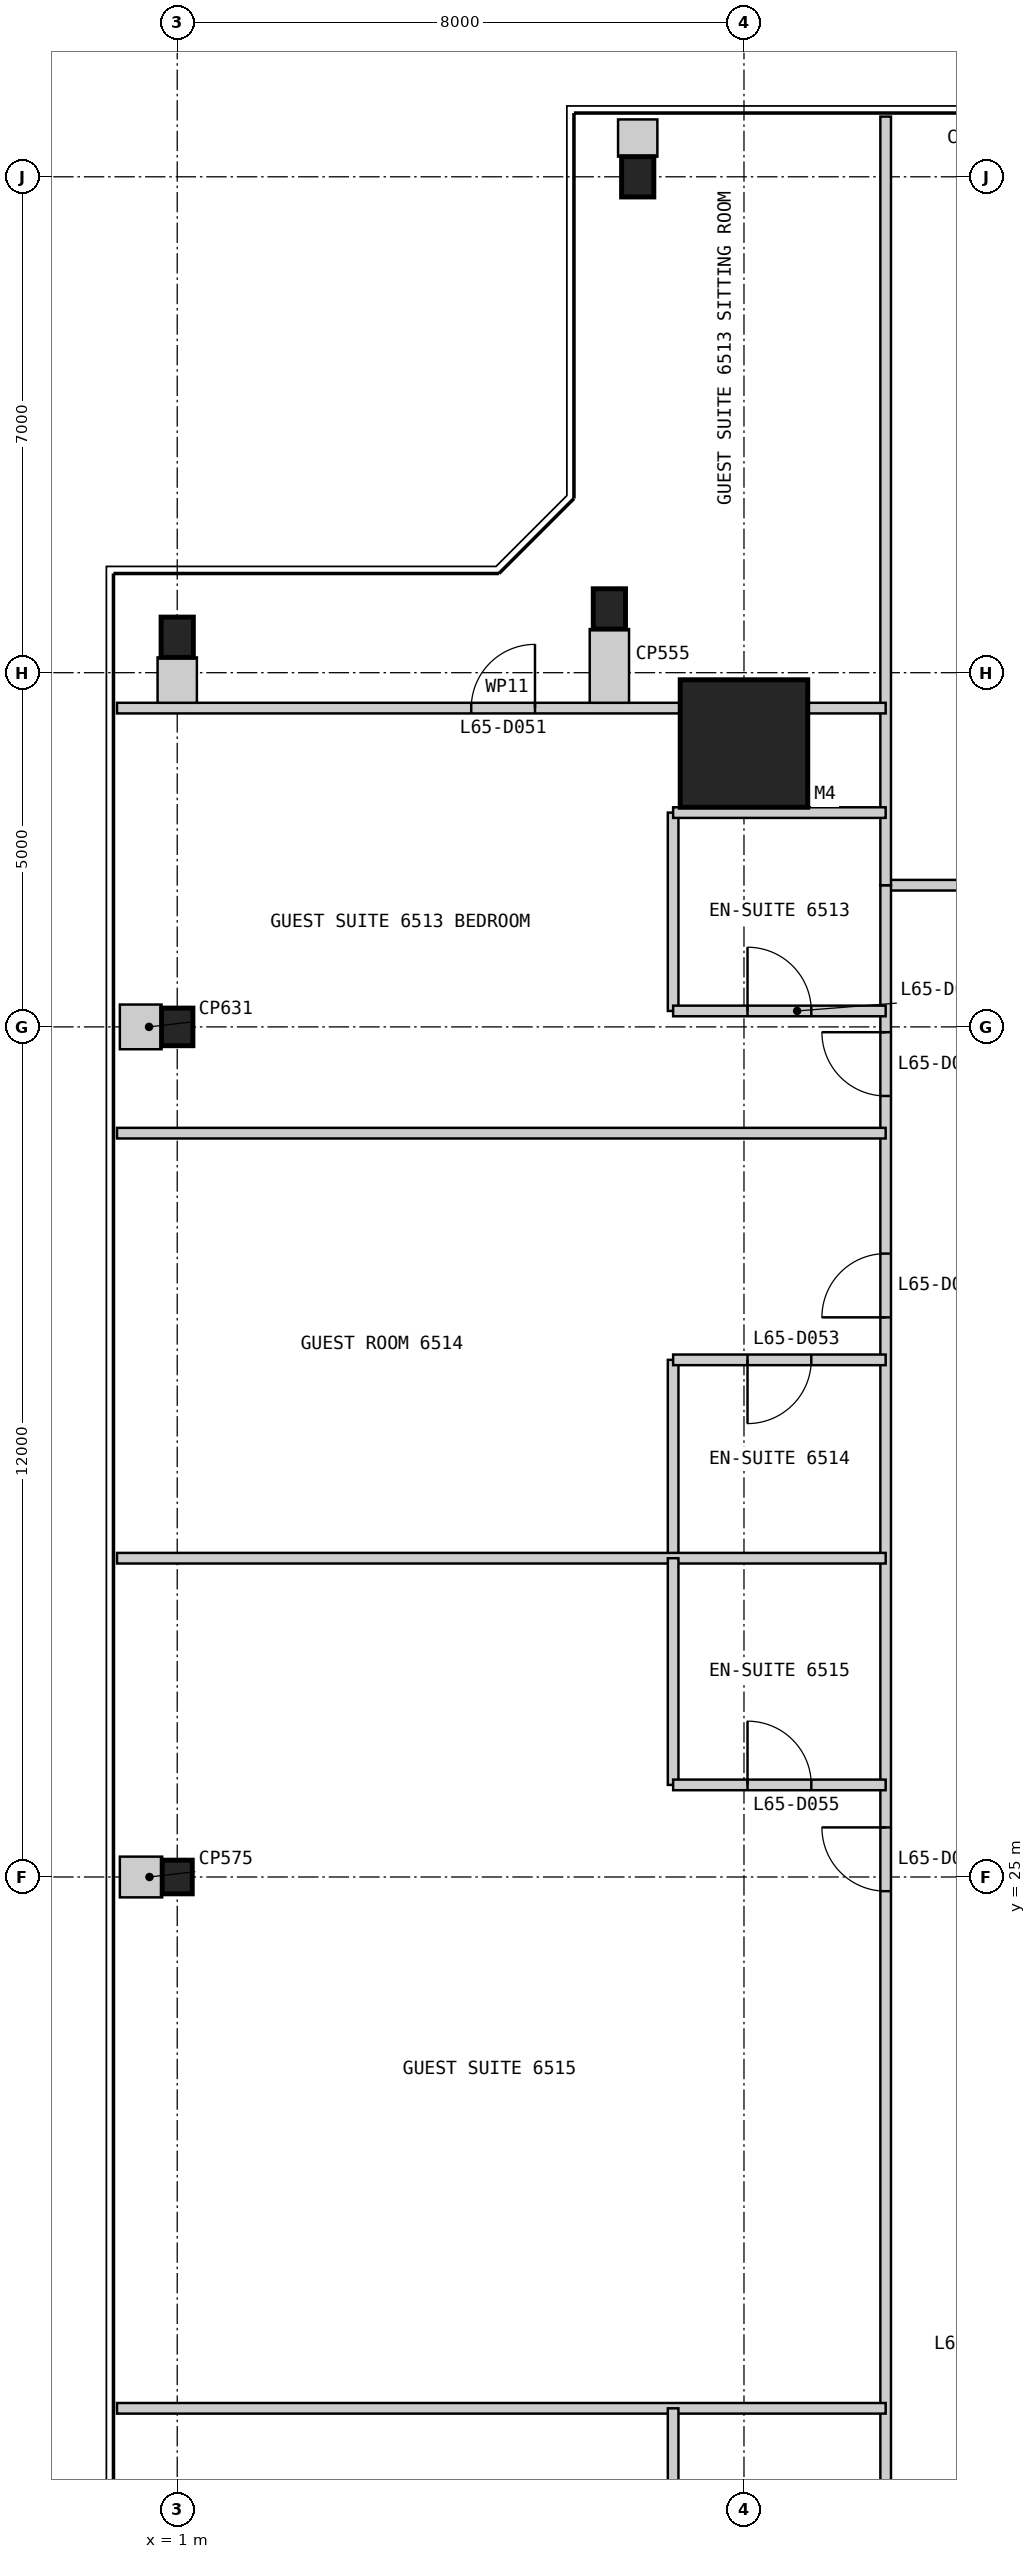
"""IFC4 building model, lengths in metres.
Left out: names, types, materials, properties, quantities, classifications, styles, units other than length and angle.
Written with IfcOpenShell. Run it as: python <this file> out.ifc"""

import sys

from ifc_helpers import new_model, si_unit, direction, frame, frame_2d, origin, origin_2d, place, context, subcontext, project, spatial, rectangle, i_section, extrude, element, fill, save


model = new_model("IFC4")
c1 = context("Model", 3, precision=1e-05, world=origin(), true_north=direction((0.0, 1.0)))
c2 = subcontext(c1, "Body", "Model", "MODEL_VIEW")
j1 = project(units=[si_unit("LENGTHUNIT", "METRE"), si_unit("PLANEANGLEUNIT", "RADIAN")], contexts=[c1])
p1 = place(None, origin())
s1 = spatial("IfcSite", under=j1, at=p1, CompositionType="ELEMENT")
p2 = place(p1, origin())
s2 = spatial("IfcBuilding", under=s1, at=p2, CompositionType="ELEMENT")
p3 = place(p2, frame((0.0, 0.0, 273.0)))
s3 = spatial("IfcBuildingStorey", under=s2, at=p3, CompositionType="ELEMENT", Elevation=273.0)
p4 = place(p3, frame((9.0, 41.0, 0.0), z_axis=(0.0, 0.0, 1.0), x_axis=(1.0, 0.0, 0.0)))
e1 = element("IfcColumn", 1, at=p4, inside=s3, PredefinedType="COLUMN", context=c2, shape_type="SweptSolid", body=[
    extrude(rectangle(XDim=1.8, YDim=1.8, at=origin_2d()), origin(), (0.0, 0.0, 1.0), 3.4),
])
for number, where, z_axis, x_axis in (
    (2, (7.5, 49.0, 0.0), (0.0, 0.0, 1.0), (1.0, 0.0, 0.0)),
    (3, (7.1, 42.9, 0.0), (0.0, 0.0, 1.0), (1.0, 0.0, 0.0)),
    (4, (1.0, 42.5, 0.0), (0.0, 0.0, 1.0), (1.0, 0.0, 0.0)),
):
    element("IfcColumn", number, at=place(p3, frame(where, z_axis=z_axis, x_axis=x_axis)), inside=s3, PredefinedType="COLUMN", context=c2, shape_type="SweptSolid", body=[
        extrude(i_section(OverallWidth=0.455, OverallDepth=0.569, WebThickness=0.078, FlangeThickness=0.125, at=origin_2d()), origin(), (0.0, 0.0, 1.0), 3.4),
    ])
p5 = place(p3, frame((1.0, 37.0, 0.0), z_axis=(0.0, 0.0, 1.0), x_axis=(1.0, 0.0, 0.0)))
e5 = element("IfcColumn", 5, at=p5, inside=s3, PredefinedType="COLUMN", context=c2, shape_type="SweptSolid", body=[
    extrude(i_section(OverallWidth=0.442, OverallDepth=0.531, WebThickness=0.066, FlangeThickness=0.106, at=origin_2d()), origin(), (0.0, 0.0, 1.0), 3.4),
])
p6 = place(p3, frame((1.0, 25.0, 0.0), z_axis=(0.0, 0.0, 1.0), x_axis=(1.0, 0.0, 0.0)))
e6 = element("IfcColumn", 6, at=p6, inside=s3, PredefinedType="COLUMN", context=c2, shape_type="SweptSolid", body=[
    extrude(i_section(OverallWidth=0.424, OverallDepth=0.475, WebThickness=0.048, FlangeThickness=0.077, at=origin_2d()), origin(), (0.0, 0.0, 1.0), 3.4),
])
p7 = place(p3, frame((39.0, 39.0, 0.0), z_axis=(0.0, 0.0, 1.0), x_axis=(-1.0, 0.0, 0.0)))
e7 = element("IfcWall", 7, at=p7, inside=s3, PredefinedType="PARTITIONING", context=c2, shape_type="SweptSolid", body=[
    extrude(rectangle(XDim=28.0, YDim=0.15, at=frame_2d((14.0, 0.0))), origin(), (0.0, 0.0, 1.0), 2.844),
])
p8 = place(p7, frame((1.9, 0.0, 0.0)))
e8 = element("IfcOpeningElement", 8, at=p8, cuts=e7, PredefinedType="OPENING", context=c2, shape_type="SweptSolid", body=[
    extrude(rectangle(XDim=0.9, YDim=2.1, at=frame_2d((0.45, 1.05))), frame((0.0, 0.085, 0.0), z_axis=(0.0, -1.0, 0.0), x_axis=(1.0, 0.0, 0.0)), (0.0, 0.0, 1.0), 0.17),
])
p9 = place(p7, frame((5.2, 0.0, 0.0)))
e9 = element("IfcOpeningElement", 9, at=p9, cuts=e7, PredefinedType="OPENING", context=c2, shape_type="SweptSolid", body=[
    extrude(rectangle(XDim=0.9, YDim=2.1, at=frame_2d((0.45, 1.05))), frame((0.0, 0.085, 0.0), z_axis=(0.0, -1.0, 0.0), x_axis=(1.0, 0.0, 0.0)), (0.0, 0.0, 1.0), 0.17),
])
p10 = place(p7, frame((13.3, 0.0, 0.0)))
e10 = element("IfcOpeningElement", 10, at=p10, cuts=e7, PredefinedType="OPENING", context=c2, shape_type="SweptSolid", body=[
    extrude(rectangle(XDim=0.9, YDim=2.1, at=frame_2d((0.45, 1.05))), frame((0.0, 0.085, 0.0), z_axis=(0.0, -1.0, 0.0), x_axis=(1.0, 0.0, 0.0)), (0.0, 0.0, 1.0), 0.17),
])
p11 = place(p7, frame((24.9, 0.0, 0.0)))
e11 = element("IfcOpeningElement", 11, at=p11, cuts=e7, PredefinedType="OPENING", context=c2, shape_type="SweptSolid", body=[
    extrude(rectangle(XDim=0.9, YDim=2.1, at=frame_2d((0.45, 1.05))), frame((0.0, 0.085, 0.0), z_axis=(0.0, -1.0, 0.0), x_axis=(1.0, 0.0, 0.0)), (0.0, 0.0, 1.0), 0.17),
])
p12 = place(p3, frame((11.0, 39.0, 0.0), z_axis=(0.0, 0.0, 1.0), x_axis=(0.0, -1.0, 0.0)))
e12 = element("IfcWall", 12, at=p12, inside=s3, PredefinedType="PARTITIONING", context=c2, shape_type="SweptSolid", body=[
    extrude(rectangle(XDim=28.0, YDim=0.15, at=frame_2d((14.0, 0.0))), origin(), (0.0, 0.0, 1.0), 2.844),
])
p13 = place(p12, frame((2.075, 0.0, 0.0)))
e13 = element("IfcOpeningElement", 13, at=p13, cuts=e12, PredefinedType="OPENING", context=c2, shape_type="SweptSolid", body=[
    extrude(rectangle(XDim=0.9, YDim=2.1, at=frame_2d((0.45, 1.05))), frame((0.0, 0.085, 0.0), z_axis=(0.0, -1.0, 0.0), x_axis=(1.0, 0.0, 0.0)), (0.0, 0.0, 1.0), 0.17),
])
p14 = place(p12, frame((5.2, 0.0, 0.0)))
e14 = element("IfcOpeningElement", 14, at=p14, cuts=e12, PredefinedType="OPENING", context=c2, shape_type="SweptSolid", body=[
    extrude(rectangle(XDim=0.9, YDim=2.1, at=frame_2d((0.45, 1.05))), frame((0.0, 0.085, 0.0), z_axis=(0.0, -1.0, 0.0), x_axis=(1.0, 0.0, 0.0)), (0.0, 0.0, 1.0), 0.17),
])
p15 = place(p12, frame((13.3, 0.0, 0.0)))
e15 = element("IfcOpeningElement", 15, at=p15, cuts=e12, PredefinedType="OPENING", context=c2, shape_type="SweptSolid", body=[
    extrude(rectangle(XDim=0.9, YDim=2.1, at=frame_2d((0.45, 1.05))), frame((0.0, 0.085, 0.0), z_axis=(0.0, -1.0, 0.0), x_axis=(1.0, 0.0, 0.0)), (0.0, 0.0, 1.0), 0.17),
])
p16 = place(p12, frame((24.9, 0.0, 0.0)))
e16 = element("IfcOpeningElement", 16, at=p16, cuts=e12, PredefinedType="OPENING", context=c2, shape_type="SweptSolid", body=[
    extrude(rectangle(XDim=0.9, YDim=2.1, at=frame_2d((0.45, 1.05))), frame((0.0, 0.085, 0.0), z_axis=(0.0, -1.0, 0.0), x_axis=(1.0, 0.0, 0.0)), (0.0, 0.0, 1.0), 0.17),
])
p17 = place(p3, frame((11.0, 49.85, 0.0), z_axis=(0.0, 0.0, 1.0), x_axis=(0.0, -1.0, 0.0)))
e17 = element("IfcWall", 17, at=p17, inside=s3, PredefinedType="PARTITIONING", context=c2, shape_type="SweptSolid", body=[
    extrude(rectangle(XDim=10.85, YDim=0.15, at=frame_2d((5.425, 0.0))), origin(), (0.0, 0.0, 1.0), 2.844),
])
p18 = place(p3, frame((8.0, 40.025, 0.0), z_axis=(0.0, 0.0, 1.0), x_axis=(0.0, -1.0, 0.0)))
e18 = element("IfcWall", 18, at=p18, inside=s3, PredefinedType="PARTITIONING", context=c2, shape_type="SweptSolid", body=[
    extrude(rectangle(XDim=2.8, YDim=0.15, at=frame_2d((1.4, 0.0))), origin(), (0.0, 0.0, 1.0), 3.25),
])
p19 = place(p3, frame((8.0, 37.225, 0.0), z_axis=(0.0, 0.0, 1.0), x_axis=(1.0, 0.0, 0.0)))
e19 = element("IfcWall", 19, at=p19, inside=s3, PredefinedType="PARTITIONING", context=c2, shape_type="SweptSolid", body=[
    extrude(rectangle(XDim=3.0, YDim=0.15, at=frame_2d((1.5, 0.0))), origin(), (0.0, 0.0, 1.0), 3.25),
])
p20 = place(p19, frame((1.05, 0.0, 0.0)))
e20 = element("IfcOpeningElement", 20, at=p20, cuts=e19, PredefinedType="OPENING", context=c2, shape_type="SweptSolid", body=[
    extrude(rectangle(XDim=0.9, YDim=2.1, at=frame_2d((0.45, 1.05))), frame((0.0, 0.085, 0.0), z_axis=(0.0, -1.0, 0.0), x_axis=(1.0, 0.0, 0.0)), (0.0, 0.0, 1.0), 0.17),
])
p21 = place(p3, frame((8.0, 40.025, 0.0), z_axis=(0.0, 0.0, 1.0), x_axis=(1.0, 0.0, 0.0)))
e21 = element("IfcWall", 21, at=p21, inside=s3, PredefinedType="PARTITIONING", context=c2, shape_type="SweptSolid", body=[
    extrude(rectangle(XDim=3.0, YDim=0.15, at=frame_2d((1.5, 0.0))), origin(), (0.0, 0.0, 1.0), 3.25),
])
p22 = place(p3, frame((0.15, 41.5, 0.0), z_axis=(0.0, 0.0, 1.0), x_axis=(1.0, 0.0, 0.0)))
e22 = element("IfcWall", 22, at=p22, inside=s3, PredefinedType="PARTITIONING", context=c2, shape_type="SweptSolid", body=[
    extrude(rectangle(XDim=10.85, YDim=0.15, at=frame_2d((5.425, 0.0))), origin(), (0.0, 0.0, 1.0), 3.25),
])
p23 = place(p22, frame((5.0, 0.0, 0.0)))
e23 = element("IfcOpeningElement", 23, at=p23, cuts=e22, PredefinedType="OPENING", context=c2, shape_type="SweptSolid", body=[
    extrude(rectangle(XDim=0.9, YDim=2.1, at=frame_2d((0.45, 1.05))), frame((0.0, 0.085, 0.0), z_axis=(0.0, -1.0, 0.0), x_axis=(1.0, 0.0, 0.0)), (0.0, 0.0, 1.0), 0.17),
])
p24 = place(p3, frame((0.15, 35.5, 0.0), z_axis=(0.0, 0.0, 1.0), x_axis=(1.0, 0.0, 0.0)))
e24 = element("IfcWall", 24, at=p24, inside=s3, PredefinedType="PARTITIONING", context=c2, shape_type="SweptSolid", body=[
    extrude(rectangle(XDim=10.85, YDim=0.15, at=frame_2d((5.425, 0.0))), origin(), (0.0, 0.0, 1.0), 3.25),
])
p25 = place(p3, frame((8.0, 32.3, 0.0), z_axis=(0.0, 0.0, 1.0), x_axis=(0.0, -1.0, 0.0)))
e25 = element("IfcWall", 25, at=p25, inside=s3, PredefinedType="PARTITIONING", context=c2, shape_type="SweptSolid", body=[
    extrude(rectangle(XDim=2.8, YDim=0.15, at=frame_2d((1.4, 0.0))), origin(), (0.0, 0.0, 1.0), 3.25),
])
p26 = place(p3, frame((8.0, 32.3, 0.0), z_axis=(0.0, 0.0, 1.0), x_axis=(1.0, 0.0, 0.0)))
e26 = element("IfcWall", 26, at=p26, inside=s3, PredefinedType="PARTITIONING", context=c2, shape_type="SweptSolid", body=[
    extrude(rectangle(XDim=3.0, YDim=0.15, at=frame_2d((1.5, 0.0))), origin(), (0.0, 0.0, 1.0), 3.25),
])
p27 = place(p26, frame((1.05, 0.0, 0.0)))
e27 = element("IfcOpeningElement", 27, at=p27, cuts=e26, PredefinedType="OPENING", context=c2, shape_type="SweptSolid", body=[
    extrude(rectangle(XDim=0.9, YDim=2.1, at=frame_2d((0.45, 1.05))), frame((0.0, 0.085, 0.0), z_axis=(0.0, -1.0, 0.0), x_axis=(1.0, 0.0, 0.0)), (0.0, 0.0, 1.0), 0.17),
])
p28 = place(p3, frame((0.15, 29.5, 0.0), z_axis=(0.0, 0.0, 1.0), x_axis=(1.0, 0.0, 0.0)))
e28 = element("IfcWall", 28, at=p28, inside=s3, PredefinedType="PARTITIONING", context=c2, shape_type="SweptSolid", body=[
    extrude(rectangle(XDim=10.85, YDim=0.15, at=frame_2d((5.425, 0.0))), origin(), (0.0, 0.0, 1.0), 3.25),
])
p29 = place(p3, frame((8.0, 29.5, 0.0), z_axis=(0.0, 0.0, 1.0), x_axis=(0.0, -1.0, 0.0)))
e29 = element("IfcWall", 29, at=p29, inside=s3, PredefinedType="PARTITIONING", context=c2, shape_type="SweptSolid", body=[
    extrude(rectangle(XDim=3.2, YDim=0.15, at=frame_2d((1.6, 0.0))), origin(), (0.0, 0.0, 1.0), 3.25),
])
p30 = place(p3, frame((8.0, 26.3, 0.0), z_axis=(0.0, 0.0, 1.0), x_axis=(1.0, 0.0, 0.0)))
e30 = element("IfcWall", 30, at=p30, inside=s3, PredefinedType="PARTITIONING", context=c2, shape_type="SweptSolid", body=[
    extrude(rectangle(XDim=3.0, YDim=0.15, at=frame_2d((1.5, 0.0))), origin(), (0.0, 0.0, 1.0), 3.25),
])
p31 = place(p30, frame((1.05, 0.0, 0.0)))
e31 = element("IfcOpeningElement", 31, at=p31, cuts=e30, PredefinedType="OPENING", context=c2, shape_type="SweptSolid", body=[
    extrude(rectangle(XDim=0.9, YDim=2.1, at=frame_2d((0.45, 1.05))), frame((0.0, 0.085, 0.0), z_axis=(0.0, -1.0, 0.0), x_axis=(1.0, 0.0, 0.0)), (0.0, 0.0, 1.0), 0.17),
])
p32 = place(p3, frame((0.15, 17.5, 0.0), z_axis=(0.0, 0.0, 1.0), x_axis=(1.0, 0.0, 0.0)))
e32 = element("IfcWall", 32, at=p32, inside=s3, PredefinedType="PARTITIONING", context=c2, shape_type="SweptSolid", body=[
    extrude(rectangle(XDim=10.85, YDim=0.15, at=frame_2d((5.425, 0.0))), origin(), (0.0, 0.0, 1.0), 3.25),
])
p33 = place(p3, frame((8.0, 17.5, 0.0), z_axis=(0.0, 0.0, 1.0), x_axis=(0.0, -1.0, 0.0)))
e33 = element("IfcWall", 33, at=p33, inside=s3, PredefinedType="PARTITIONING", context=c2, shape_type="SweptSolid", body=[
    extrude(rectangle(XDim=2.8, YDim=0.15, at=frame_2d((1.4, 0.0))), origin(), (0.0, 0.0, 1.0), 3.25),
])
p34 = place(p3, frame((7.5, 49.81, 0.0), z_axis=(0.0, 0.0, 1.0), x_axis=(0.0, -1.0, 0.0)))
e34 = element("IfcWall", 34, at=p34, inside=s3, PredefinedType="PARTITIONING", context=c2, shape_type="SweptSolid", body=[
    extrude(rectangle(XDim=0.526, YDim=0.555, at=frame_2d((0.263, 0.0))), origin(), (0.0, 0.0, 1.0), 3.25),
])
p35 = place(p3, frame((7.1, 41.575, 0.0), z_axis=(0.0, 0.0, 1.0), x_axis=(0.0, 1.0, 0.0)))
e35 = element("IfcWall", 35, at=p35, inside=s3, PredefinedType="PARTITIONING", context=c2, shape_type="SweptSolid", body=[
    extrude(rectangle(XDim=1.041, YDim=0.555, at=frame_2d((0.52, 0.0))), origin(), (0.0, 0.0, 1.0), 3.25),
])
p36 = place(p3, frame((1.0, 41.575, 0.0), z_axis=(0.0, 0.0, 1.0), x_axis=(0.0, 1.0, 0.0)))
e36 = element("IfcWall", 36, at=p36, inside=s3, PredefinedType="PARTITIONING", context=c2, shape_type="SweptSolid", body=[
    extrude(rectangle(XDim=0.641, YDim=0.555, at=frame_2d((0.32, 0.0))), origin(), (0.0, 0.0, 1.0), 2.338),
])
p37 = place(p3, frame((0.19, 37.0, 0.0), z_axis=(0.0, 0.0, 1.0), x_axis=(1.0, 0.0, 0.0)))
e37 = element("IfcWall", 37, at=p37, inside=s3, PredefinedType="PARTITIONING", context=c2, shape_type="SweptSolid", body=[
    extrude(rectangle(XDim=0.589, YDim=0.631, at=frame_2d((0.294, 0.0))), origin(), (0.0, 0.0, 1.0), 3.25),
])
p38 = place(p3, frame((0.19, 25.0, 0.0), z_axis=(0.0, 0.0, 1.0), x_axis=(1.0, 0.0, 0.0)))
e38 = element("IfcWall", 38, at=p38, inside=s3, PredefinedType="PARTITIONING", context=c2, shape_type="SweptSolid", body=[
    extrude(rectangle(XDim=0.598, YDim=0.575, at=frame_2d((0.299, 0.0))), origin(), (0.0, 0.0, 1.0), 3.25),
])
p39 = place(p20, origin())
e39 = element("IfcDoor", 39, at=p39, inside=s3, OperationType="SINGLE_SWING_LEFT", PredefinedType="DOOR", context=c2, shape_type="SweptSolid", body=[
    extrude(rectangle(XDim=0.9, YDim=2.1, at=frame_2d((0.45, 1.05))), frame((0.0, 0.025, 0.0), z_axis=(0.0, -1.0, 0.0), x_axis=(1.0, 0.0, 0.0)), (0.0, 0.0, 1.0), 0.05),
])
fill(e20, e39)
p40 = place(p23, origin())
e40 = element("IfcDoor", 40, at=p40, inside=s3, OperationType="SINGLE_SWING_RIGHT", PredefinedType="DOOR", context=c2, shape_type="SweptSolid", body=[
    extrude(rectangle(XDim=0.9, YDim=2.1, at=frame_2d((0.45, 1.05))), frame((0.0, 0.025, 0.0), z_axis=(0.0, -1.0, 0.0), x_axis=(1.0, 0.0, 0.0)), (0.0, 0.0, 1.0), 0.05),
])
fill(e23, e40)
p41 = place(p13, frame((0.9, 0.0, 0.0), z_axis=(0.0, 0.0, 1.0), x_axis=(-1.0, 0.0, 0.0)))
e41 = element("IfcDoor", 41, at=p41, inside=s3, OperationType="SINGLE_SWING_RIGHT", PredefinedType="DOOR", context=c2, shape_type="SweptSolid", body=[
    extrude(rectangle(XDim=0.9, YDim=2.1, at=frame_2d((0.45, 1.05))), frame((0.0, 0.025, 0.0), z_axis=(0.0, -1.0, 0.0), x_axis=(1.0, 0.0, 0.0)), (0.0, 0.0, 1.0), 0.05),
])
fill(e13, e41)
p42 = place(p27, frame((0.9, 0.0, 0.0), z_axis=(0.0, 0.0, 1.0), x_axis=(-1.0, 0.0, 0.0)))
e42 = element("IfcDoor", 42, at=p42, inside=s3, OperationType="SINGLE_SWING_RIGHT", PredefinedType="DOOR", context=c2, shape_type="SweptSolid", body=[
    extrude(rectangle(XDim=0.9, YDim=2.1, at=frame_2d((0.45, 1.05))), frame((0.0, 0.025, 0.0), z_axis=(0.0, -1.0, 0.0), x_axis=(1.0, 0.0, 0.0)), (0.0, 0.0, 1.0), 0.05),
])
fill(e27, e42)
p43 = place(p14, frame((0.9, 0.0, 0.0), z_axis=(0.0, 0.0, 1.0), x_axis=(-1.0, 0.0, 0.0)))
e43 = element("IfcDoor", 43, at=p43, inside=s3, OperationType="SINGLE_SWING_LEFT", PredefinedType="DOOR", context=c2, shape_type="SweptSolid", body=[
    extrude(rectangle(XDim=0.9, YDim=2.1, at=frame_2d((0.45, 1.05))), frame((0.0, 0.025, 0.0), z_axis=(0.0, -1.0, 0.0), x_axis=(1.0, 0.0, 0.0)), (0.0, 0.0, 1.0), 0.05),
])
fill(e14, e43)
p44 = place(p31, origin())
e44 = element("IfcDoor", 44, at=p44, inside=s3, OperationType="SINGLE_SWING_LEFT", PredefinedType="DOOR", context=c2, shape_type="SweptSolid", body=[
    extrude(rectangle(XDim=0.9, YDim=2.1, at=frame_2d((0.45, 1.05))), frame((0.0, 0.025, 0.0), z_axis=(0.0, -1.0, 0.0), x_axis=(1.0, 0.0, 0.0)), (0.0, 0.0, 1.0), 0.05),
])
fill(e31, e44)
p45 = place(p15, frame((0.9, 0.0, 0.0), z_axis=(0.0, 0.0, 1.0), x_axis=(-1.0, 0.0, 0.0)))
e45 = element("IfcDoor", 45, at=p45, inside=s3, OperationType="SINGLE_SWING_RIGHT", PredefinedType="DOOR", context=c2, shape_type="SweptSolid", body=[
    extrude(rectangle(XDim=0.9, YDim=2.1, at=frame_2d((0.45, 1.05))), frame((0.0, 0.025, 0.0), z_axis=(0.0, -1.0, 0.0), x_axis=(1.0, 0.0, 0.0)), (0.0, 0.0, 1.0), 0.05),
])
fill(e15, e45)
save(model, sys.argv[1])
